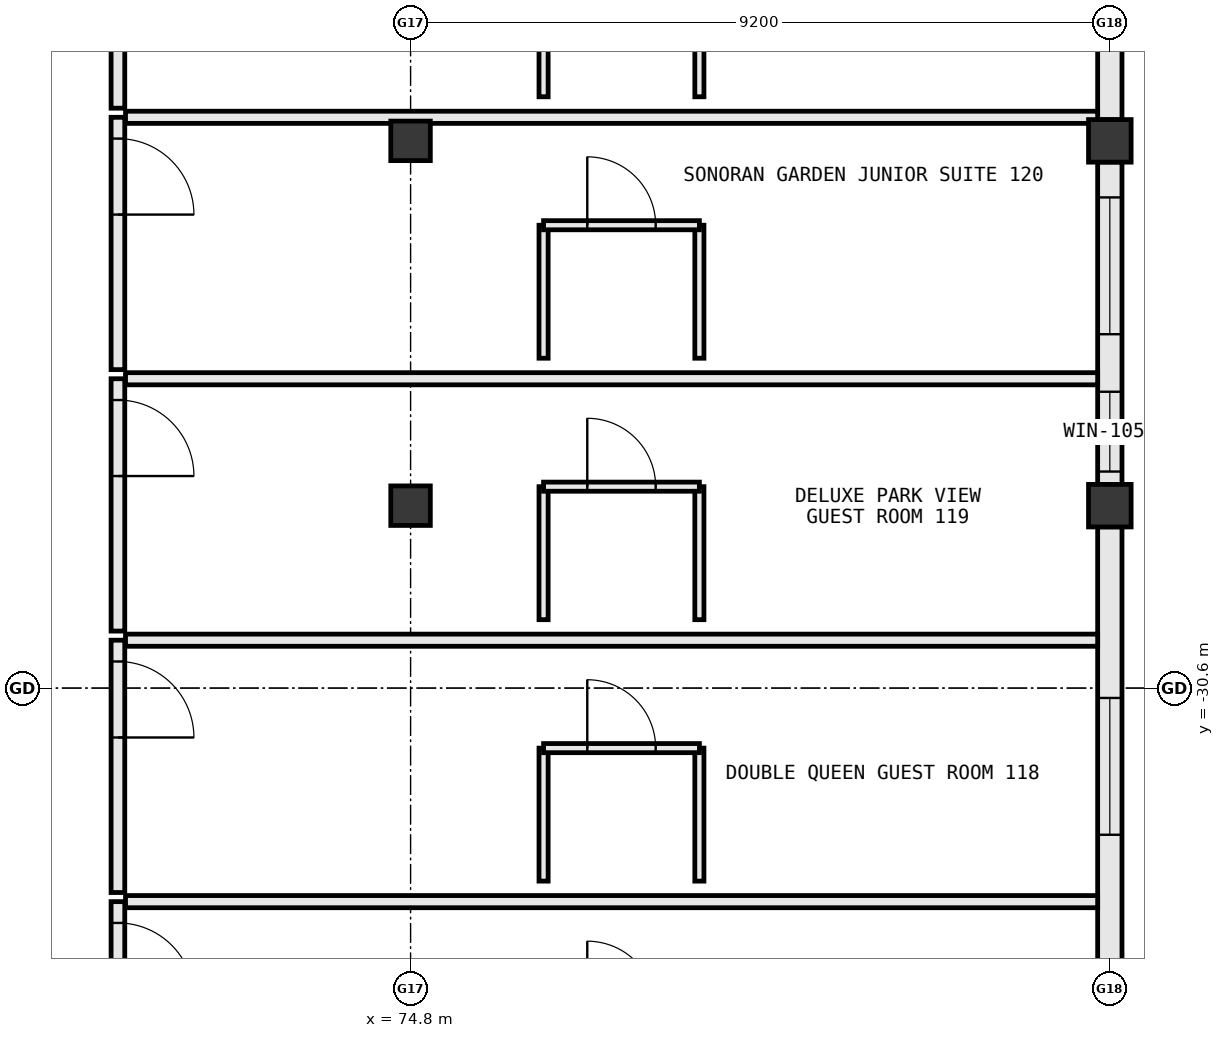
"""IFC4 building model, lengths in metres.
Left out: names, types, materials, properties, quantities, classifications, styles, units other than length and angle.
Written with IfcOpenShell. Run it as: python <this file> out.ifc"""

import sys

from ifc_helpers import new_model, si_unit, direction, frame, frame_2d, origin, origin_2d, place, context, subcontext, project, spatial, rectangle, extrude, element, fill, save


model = new_model("IFC4")
c1 = context("Model", 3, precision=1e-05, world=origin(), true_north=direction((0.0, 1.0)))
c2 = subcontext(c1, "Body", "Model", "MODEL_VIEW")
j1 = project(units=[si_unit("LENGTHUNIT", "METRE"), si_unit("PLANEANGLEUNIT", "RADIAN")], contexts=[c1])
p1 = place(None, origin())
s1 = spatial("IfcSite", under=j1, at=p1, CompositionType="ELEMENT")
p2 = place(p1, origin())
s2 = spatial("IfcBuilding", under=s1, at=p2, CompositionType="ELEMENT")
p3 = place(p2, frame((0.0, 0.0, 20.0)))
s3 = spatial("IfcBuildingStorey", under=s2, at=p3, CompositionType="ELEMENT", Elevation=20.0)
for number, where, z_axis, x_axis in (
    (1, (74.8, -28.2, 0.0), (0.0, 0.0, 1.0), (1.0, 0.0, 0.0)),
    (2, (74.8, -23.4, 0.0), (0.0, 0.0, 1.0), (1.0, 0.0, 0.0)),
):
    element("IfcColumn", number, at=place(p3, frame(where, z_axis=z_axis, x_axis=x_axis)), inside=s3, PredefinedType="COLUMN", context=c2, shape_type="SweptSolid", body=[
        extrude(rectangle(XDim=0.52, YDim=0.52, at=origin_2d()), origin(), (0.0, 0.0, 1.0), 3.8),
    ])
for number, where, z_axis, x_axis in (
    (3, (84.0, -28.2, 0.0), (0.0, 0.0, 1.0), (1.0, 0.0, 0.0)),
    (4, (84.0, -23.4, 0.0), (0.0, 0.0, 1.0), (1.0, 0.0, 0.0)),
):
    element("IfcColumn", number, at=place(p3, frame(where, z_axis=z_axis, x_axis=x_axis)), inside=s3, PredefinedType="COLUMN", context=c2, shape_type="SweptSolid", body=[
        extrude(rectangle(XDim=0.56, YDim=0.56, at=origin_2d()), origin(), (0.0, 0.0, 1.0), 3.8),
    ])
p4 = place(p3, frame((84.0, -37.522, 0.0), z_axis=(0.0, 0.0, 1.0), x_axis=(0.0, 1.0, 0.0)))
e5 = element("IfcWall", 5, at=p4, inside=s3, PredefinedType="STANDARD", context=c2, shape_type="SweptSolid", body=[
    extrude(rectangle(XDim=9.044, YDim=0.32, at=frame_2d((4.522, 0.0))), origin(), (0.0, 0.0, 1.0), 2.965),
])
p5 = place(p4, frame((1.552, 0.0, 0.85)))
e6 = element("IfcOpeningElement", 6, at=p5, cuts=e5, PredefinedType="OPENING", context=c2, shape_type="SweptSolid", body=[
    extrude(rectangle(XDim=1.8, YDim=1.85, at=frame_2d((0.9, 0.925))), frame((0.0, 0.172, 0.0), z_axis=(0.0, -1.0, 0.0), x_axis=(1.0, 0.0, 0.0)), (0.0, 0.0, 1.0), 0.344),
])
p6 = place(p4, frame((4.992, 0.0, 0.85)))
e7 = element("IfcOpeningElement", 7, at=p6, cuts=e5, PredefinedType="OPENING", context=c2, shape_type="SweptSolid", body=[
    extrude(rectangle(XDim=1.8, YDim=1.85, at=frame_2d((0.9, 0.925))), frame((0.0, 0.172, 0.0), z_axis=(0.0, -1.0, 0.0), x_axis=(1.0, 0.0, 0.0)), (0.0, 0.0, 1.0), 0.344),
])
p7 = place(p3, frame((84.0, -27.922, 0.0), z_axis=(0.0, 0.0, 1.0), x_axis=(0.0, 1.0, 0.0)))
e8 = element("IfcWall", 8, at=p7, inside=s3, PredefinedType="STANDARD", context=c2, shape_type="SweptSolid", body=[
    extrude(rectangle(XDim=4.244, YDim=0.32, at=frame_2d((2.122, 0.0))), origin(), (0.0, 0.0, 1.0), 2.965),
])
p8 = place(p7, frame((0.171, 0.0, 0.85)))
e9 = element("IfcOpeningElement", 9, at=p8, cuts=e8, PredefinedType="OPENING", context=c2, shape_type="SweptSolid", body=[
    extrude(rectangle(XDim=1.05, YDim=1.45, at=frame_2d((0.525, 0.725))), frame((0.0, 0.172, 0.0), z_axis=(0.0, -1.0, 0.0), x_axis=(1.0, 0.0, 0.0)), (0.0, 0.0, 1.0), 0.344),
])
p9 = place(p7, frame((1.978, 0.0, 0.85)))
e10 = element("IfcOpeningElement", 10, at=p9, cuts=e8, PredefinedType="OPENING", context=c2, shape_type="SweptSolid", body=[
    extrude(rectangle(XDim=1.8, YDim=1.85, at=frame_2d((0.9, 0.925))), frame((0.0, 0.172, 0.0), z_axis=(0.0, -1.0, 0.0), x_axis=(1.0, 0.0, 0.0)), (0.0, 0.0, 1.0), 0.344),
])
p10 = place(p3, frame((84.0, -23.122, 0.0), z_axis=(0.0, 0.0, 1.0), x_axis=(0.0, 1.0, 0.0)))
e11 = element("IfcWall", 11, at=p10, inside=s3, PredefinedType="STANDARD", context=c2, shape_type="SweptSolid", body=[
    extrude(rectangle(XDim=4.244, YDim=0.32, at=frame_2d((2.122, 0.0))), origin(), (0.0, 0.0, 1.0), 2.965),
])
p11 = place(p10, frame((0.912, 0.0, 0.85)))
e12 = element("IfcOpeningElement", 12, at=p11, cuts=e11, PredefinedType="OPENING", context=c2, shape_type="SweptSolid", body=[
    extrude(rectangle(XDim=1.8, YDim=1.85, at=frame_2d((0.9, 0.925))), frame((0.0, 0.172, 0.0), z_axis=(0.0, -1.0, 0.0), x_axis=(1.0, 0.0, 0.0)), (0.0, 0.0, 1.0), 0.344),
])
p12 = place(p3, frame((70.95, -33.41, 0.0), z_axis=(0.0, 0.0, 1.0), x_axis=(0.0, -1.0, 0.0)))
e13 = element("IfcWall", 13, at=p12, inside=s3, PredefinedType="PARTITIONING", context=c2, shape_type="SweptSolid", body=[
    extrude(rectangle(XDim=3.32, YDim=0.18, at=frame_2d((1.66, 0.0))), origin(), (0.0, 0.0, 1.0), 3.55),
])
p13 = place(p12, frame((0.28, 0.0, 0.0)))
e14 = element("IfcOpeningElement", 14, at=p13, cuts=e13, PredefinedType="OPENING", context=c2, shape_type="SweptSolid", body=[
    extrude(rectangle(XDim=1.0, YDim=2.2, at=frame_2d((0.5, 1.1))), frame((0.0, 0.102, 0.0), z_axis=(0.0, -1.0, 0.0), x_axis=(1.0, 0.0, 0.0)), (0.0, 0.0, 1.0), 0.204),
])
p14 = place(p3, frame((71.05, -33.41, 0.0), z_axis=(0.0, 0.0, 1.0), x_axis=(1.0, 0.0, 0.0)))
e15 = element("IfcWall", 15, at=p14, inside=s3, PredefinedType="PARTITIONING", context=c2, shape_type="SweptSolid", body=[
    extrude(rectangle(XDim=12.79, YDim=0.16, at=frame_2d((6.395, 0.0))), origin(), (0.0, 0.0, 1.0), 3.55),
])
p15 = place(p3, frame((70.95, -29.97, 0.0), z_axis=(0.0, 0.0, 1.0), x_axis=(0.0, -1.0, 0.0)))
e16 = element("IfcWall", 16, at=p15, inside=s3, PredefinedType="PARTITIONING", context=c2, shape_type="SweptSolid", body=[
    extrude(rectangle(XDim=3.32, YDim=0.18, at=frame_2d((1.66, 0.0))), origin(), (0.0, 0.0, 1.0), 3.55),
])
p16 = place(p15, frame((0.28, 0.0, 0.0)))
e17 = element("IfcOpeningElement", 17, at=p16, cuts=e16, PredefinedType="OPENING", context=c2, shape_type="SweptSolid", body=[
    extrude(rectangle(XDim=1.0, YDim=2.2, at=frame_2d((0.5, 1.1))), frame((0.0, 0.102, 0.0), z_axis=(0.0, -1.0, 0.0), x_axis=(1.0, 0.0, 0.0)), (0.0, 0.0, 1.0), 0.204),
])
p17 = place(p3, frame((71.05, -29.97, 0.0), z_axis=(0.0, 0.0, 1.0), x_axis=(1.0, 0.0, 0.0)))
e18 = element("IfcWall", 18, at=p17, inside=s3, PredefinedType="PARTITIONING", context=c2, shape_type="SweptSolid", body=[
    extrude(rectangle(XDim=12.79, YDim=0.16, at=frame_2d((6.395, 0.0))), origin(), (0.0, 0.0, 1.0), 3.55),
])
for number, where, z_axis, x_axis in (
    (19, (76.55, -33.14, 0.0), (0.0, 0.0, 1.0), (0.0, 1.0, 0.0)),
    (20, (78.6, -33.14, 0.0), (0.0, 0.0, 1.0), (0.0, 1.0, 0.0)),
):
    element("IfcWall", number, at=place(p3, frame(where, z_axis=z_axis, x_axis=x_axis)), inside=s3, PredefinedType="PARTITIONING", context=c2, shape_type="SweptSolid", body=[
        extrude(rectangle(XDim=1.75, YDim=0.12, at=frame_2d((0.875, 0.0))), origin(), (0.0, 0.0, 1.0), 3.55),
    ])
p18 = place(p3, frame((76.55, -31.39, 0.0), z_axis=(0.0, 0.0, 1.0), x_axis=(1.0, 0.0, 0.0)))
e21 = element("IfcWall", 21, at=p18, inside=s3, PredefinedType="PARTITIONING", context=c2, shape_type="SweptSolid", body=[
    extrude(rectangle(XDim=2.05, YDim=0.12, at=frame_2d((1.025, 0.0))), origin(), (0.0, 0.0, 1.0), 3.55),
])
p19 = place(p18, frame((0.575, 0.0, 0.0)))
e22 = element("IfcOpeningElement", 22, at=p19, cuts=e21, PredefinedType="OPENING", context=c2, shape_type="SweptSolid", body=[
    extrude(rectangle(XDim=0.9, YDim=2.15, at=frame_2d((0.45, 1.075))), frame((0.0, 0.072, 0.0), z_axis=(0.0, -1.0, 0.0), x_axis=(1.0, 0.0, 0.0)), (0.0, 0.0, 1.0), 0.144),
])
p20 = place(p3, frame((70.95, -26.53, 0.0), z_axis=(0.0, 0.0, 1.0), x_axis=(0.0, -1.0, 0.0)))
e23 = element("IfcWall", 23, at=p20, inside=s3, PredefinedType="PARTITIONING", context=c2, shape_type="SweptSolid", body=[
    extrude(rectangle(XDim=3.32, YDim=0.18, at=frame_2d((1.66, 0.0))), origin(), (0.0, 0.0, 1.0), 3.55),
])
p21 = place(p20, frame((0.28, 0.0, 0.0)))
e24 = element("IfcOpeningElement", 24, at=p21, cuts=e23, PredefinedType="OPENING", context=c2, shape_type="SweptSolid", body=[
    extrude(rectangle(XDim=1.0, YDim=2.2, at=frame_2d((0.5, 1.1))), frame((0.0, 0.102, 0.0), z_axis=(0.0, -1.0, 0.0), x_axis=(1.0, 0.0, 0.0)), (0.0, 0.0, 1.0), 0.204),
])
p22 = place(p3, frame((71.05, -26.53, 0.0), z_axis=(0.0, 0.0, 1.0), x_axis=(1.0, 0.0, 0.0)))
e25 = element("IfcWall", 25, at=p22, inside=s3, PredefinedType="PARTITIONING", context=c2, shape_type="SweptSolid", body=[
    extrude(rectangle(XDim=12.79, YDim=0.16, at=frame_2d((6.395, 0.0))), origin(), (0.0, 0.0, 1.0), 3.55),
])
for number, where, z_axis, x_axis in (
    (26, (76.55, -29.7, 0.0), (0.0, 0.0, 1.0), (0.0, 1.0, 0.0)),
    (27, (78.6, -29.7, 0.0), (0.0, 0.0, 1.0), (0.0, 1.0, 0.0)),
):
    element("IfcWall", number, at=place(p3, frame(where, z_axis=z_axis, x_axis=x_axis)), inside=s3, PredefinedType="PARTITIONING", context=c2, shape_type="SweptSolid", body=[
        extrude(rectangle(XDim=1.75, YDim=0.12, at=frame_2d((0.875, 0.0))), origin(), (0.0, 0.0, 1.0), 3.55),
    ])
p23 = place(p3, frame((76.55, -27.95, 0.0), z_axis=(0.0, 0.0, 1.0), x_axis=(1.0, 0.0, 0.0)))
e28 = element("IfcWall", 28, at=p23, inside=s3, PredefinedType="PARTITIONING", context=c2, shape_type="SweptSolid", body=[
    extrude(rectangle(XDim=2.05, YDim=0.12, at=frame_2d((1.025, 0.0))), origin(), (0.0, 0.0, 1.0), 2.905),
])
p24 = place(p23, frame((0.575, 0.0, 0.0)))
e29 = element("IfcOpeningElement", 29, at=p24, cuts=e28, PredefinedType="OPENING", context=c2, shape_type="SweptSolid", body=[
    extrude(rectangle(XDim=0.9, YDim=2.15, at=frame_2d((0.45, 1.075))), frame((0.0, 0.072, 0.0), z_axis=(0.0, -1.0, 0.0), x_axis=(1.0, 0.0, 0.0)), (0.0, 0.0, 1.0), 0.144),
])
p25 = place(p3, frame((70.95, -23.09, 0.0), z_axis=(0.0, 0.0, 1.0), x_axis=(0.0, -1.0, 0.0)))
e30 = element("IfcWall", 30, at=p25, inside=s3, PredefinedType="PARTITIONING", context=c2, shape_type="SweptSolid", body=[
    extrude(rectangle(XDim=3.32, YDim=0.18, at=frame_2d((1.66, 0.0))), origin(), (0.0, 0.0, 1.0), 3.55),
])
p26 = place(p25, frame((0.28, 0.0, 0.0)))
e31 = element("IfcOpeningElement", 31, at=p26, cuts=e30, PredefinedType="OPENING", context=c2, shape_type="SweptSolid", body=[
    extrude(rectangle(XDim=1.0, YDim=2.2, at=frame_2d((0.5, 1.1))), frame((0.0, 0.102, 0.0), z_axis=(0.0, -1.0, 0.0), x_axis=(1.0, 0.0, 0.0)), (0.0, 0.0, 1.0), 0.204),
])
p27 = place(p3, frame((71.05, -23.09, 0.0), z_axis=(0.0, 0.0, 1.0), x_axis=(1.0, 0.0, 0.0)))
e32 = element("IfcWall", 32, at=p27, inside=s3, PredefinedType="PARTITIONING", context=c2, shape_type="SweptSolid", body=[
    extrude(rectangle(XDim=12.79, YDim=0.16, at=frame_2d((6.395, 0.0))), origin(), (0.0, 0.0, 1.0), 2.685),
])
for number, where, z_axis, x_axis in (
    (33, (76.55, -26.26, 0.0), (0.0, 0.0, 1.0), (0.0, 1.0, 0.0)),
    (34, (78.6, -26.26, 0.0), (0.0, 0.0, 1.0), (0.0, 1.0, 0.0)),
):
    element("IfcWall", number, at=place(p3, frame(where, z_axis=z_axis, x_axis=x_axis)), inside=s3, PredefinedType="PARTITIONING", context=c2, shape_type="SweptSolid", body=[
        extrude(rectangle(XDim=1.75, YDim=0.12, at=frame_2d((0.875, 0.0))), origin(), (0.0, 0.0, 1.0), 3.55),
    ])
p28 = place(p3, frame((76.55, -24.51, 0.0), z_axis=(0.0, 0.0, 1.0), x_axis=(1.0, 0.0, 0.0)))
e35 = element("IfcWall", 35, at=p28, inside=s3, PredefinedType="PARTITIONING", context=c2, shape_type="SweptSolid", body=[
    extrude(rectangle(XDim=2.05, YDim=0.12, at=frame_2d((1.025, 0.0))), origin(), (0.0, 0.0, 1.0), 3.55),
])
p29 = place(p28, frame((0.575, 0.0, 0.0)))
e36 = element("IfcOpeningElement", 36, at=p29, cuts=e35, PredefinedType="OPENING", context=c2, shape_type="SweptSolid", body=[
    extrude(rectangle(XDim=0.9, YDim=2.15, at=frame_2d((0.45, 1.075))), frame((0.0, 0.072, 0.0), z_axis=(0.0, -1.0, 0.0), x_axis=(1.0, 0.0, 0.0)), (0.0, 0.0, 1.0), 0.144),
])
p30 = place(p3, frame((70.95, -19.65, 0.0), z_axis=(0.0, 0.0, 1.0), x_axis=(0.0, -1.0, 0.0)))
e37 = element("IfcWall", 37, at=p30, inside=s3, PredefinedType="PARTITIONING", context=c2, shape_type="SweptSolid", body=[
    extrude(rectangle(XDim=3.32, YDim=0.18, at=frame_2d((1.66, 0.0))), origin(), (0.0, 0.0, 1.0), 3.55),
])
p31 = place(p30, frame((0.28, 0.0, 0.0)))
e38 = element("IfcOpeningElement", 38, at=p31, cuts=e37, PredefinedType="OPENING", context=c2, shape_type="SweptSolid", body=[
    extrude(rectangle(XDim=1.0, YDim=2.2, at=frame_2d((0.5, 1.1))), frame((0.0, 0.102, 0.0), z_axis=(0.0, -1.0, 0.0), x_axis=(1.0, 0.0, 0.0)), (0.0, 0.0, 1.0), 0.204),
])
for number, where, z_axis, x_axis in (
    (39, (76.55, -22.82, 0.0), (0.0, 0.0, 1.0), (0.0, 1.0, 0.0)),
    (40, (78.6, -22.82, 0.0), (0.0, 0.0, 1.0), (0.0, 1.0, 0.0)),
):
    element("IfcWall", number, at=place(p3, frame(where, z_axis=z_axis, x_axis=x_axis)), inside=s3, PredefinedType="PARTITIONING", context=c2, shape_type="SweptSolid", body=[
        extrude(rectangle(XDim=1.75, YDim=0.12, at=frame_2d((0.875, 0.0))), origin(), (0.0, 0.0, 1.0), 3.55),
    ])
p32 = place(p6, origin())
e41 = element("IfcWindow", 41, at=p32, inside=s3, PartitioningType="SINGLE_PANEL", PredefinedType="WINDOW", context=c2, shape_type="SweptSolid", body=[
    extrude(rectangle(XDim=1.8, YDim=1.85, at=frame_2d((0.9, 0.925))), frame((0.0, 0.03, 0.0), z_axis=(0.0, -1.0, 0.0), x_axis=(1.0, 0.0, 0.0)), (0.0, 0.0, 1.0), 0.06),
])
fill(e7, e41)
p33 = place(p8, origin())
e42 = element("IfcWindow", 42, at=p33, inside=s3, PartitioningType="SINGLE_PANEL", PredefinedType="WINDOW", context=c2, shape_type="SweptSolid", body=[
    extrude(rectangle(XDim=1.05, YDim=1.45, at=frame_2d((0.525, 0.725))), frame((0.0, 0.03, 0.0), z_axis=(0.0, -1.0, 0.0), x_axis=(1.0, 0.0, 0.0)), (0.0, 0.0, 1.0), 0.06),
])
fill(e9, e42)
p34 = place(p9, origin())
e43 = element("IfcWindow", 43, at=p34, inside=s3, PartitioningType="SINGLE_PANEL", PredefinedType="WINDOW", context=c2, shape_type="SweptSolid", body=[
    extrude(rectangle(XDim=1.8, YDim=1.85, at=frame_2d((0.9, 0.925))), frame((0.0, 0.03, 0.0), z_axis=(0.0, -1.0, 0.0), x_axis=(1.0, 0.0, 0.0)), (0.0, 0.0, 1.0), 0.06),
])
fill(e10, e43)
p35 = place(p13, origin())
e44 = element("IfcDoor", 44, at=p35, inside=s3, OperationType="SINGLE_SWING_RIGHT", PredefinedType="DOOR", context=c2, shape_type="SweptSolid", body=[
    extrude(rectangle(XDim=1.0, YDim=2.2, at=frame_2d((0.5, 1.1))), frame((0.0, 0.025, 0.0), z_axis=(0.0, -1.0, 0.0), x_axis=(1.0, 0.0, 0.0)), (0.0, 0.0, 1.0), 0.05),
])
fill(e14, e44)
p36 = place(p16, origin())
e45 = element("IfcDoor", 45, at=p36, inside=s3, OperationType="SINGLE_SWING_RIGHT", PredefinedType="DOOR", context=c2, shape_type="SweptSolid", body=[
    extrude(rectangle(XDim=1.0, YDim=2.2, at=frame_2d((0.5, 1.1))), frame((0.0, 0.025, 0.0), z_axis=(0.0, -1.0, 0.0), x_axis=(1.0, 0.0, 0.0)), (0.0, 0.0, 1.0), 0.05),
])
fill(e17, e45)
p37 = place(p19, origin())
e46 = element("IfcDoor", 46, at=p37, inside=s3, OperationType="SINGLE_SWING_LEFT", PredefinedType="DOOR", context=c2, shape_type="SweptSolid", body=[
    extrude(rectangle(XDim=0.9, YDim=2.15, at=frame_2d((0.45, 1.075))), frame((0.0, 0.025, 0.0), z_axis=(0.0, -1.0, 0.0), x_axis=(1.0, 0.0, 0.0)), (0.0, 0.0, 1.0), 0.05),
])
fill(e22, e46)
p38 = place(p21, origin())
e47 = element("IfcDoor", 47, at=p38, inside=s3, OperationType="SINGLE_SWING_RIGHT", PredefinedType="DOOR", context=c2, shape_type="SweptSolid", body=[
    extrude(rectangle(XDim=1.0, YDim=2.2, at=frame_2d((0.5, 1.1))), frame((0.0, 0.025, 0.0), z_axis=(0.0, -1.0, 0.0), x_axis=(1.0, 0.0, 0.0)), (0.0, 0.0, 1.0), 0.05),
])
fill(e24, e47)
p39 = place(p24, origin())
e48 = element("IfcDoor", 48, at=p39, inside=s3, OperationType="SINGLE_SWING_LEFT", PredefinedType="DOOR", context=c2, shape_type="SweptSolid", body=[
    extrude(rectangle(XDim=0.9, YDim=2.15, at=frame_2d((0.45, 1.075))), frame((0.0, 0.025, 0.0), z_axis=(0.0, -1.0, 0.0), x_axis=(1.0, 0.0, 0.0)), (0.0, 0.0, 1.0), 0.05),
])
fill(e29, e48)
p40 = place(p26, origin())
e49 = element("IfcDoor", 49, at=p40, inside=s3, OperationType="SINGLE_SWING_RIGHT", PredefinedType="DOOR", context=c2, shape_type="SweptSolid", body=[
    extrude(rectangle(XDim=1.0, YDim=2.2, at=frame_2d((0.5, 1.1))), frame((0.0, 0.025, 0.0), z_axis=(0.0, -1.0, 0.0), x_axis=(1.0, 0.0, 0.0)), (0.0, 0.0, 1.0), 0.05),
])
fill(e31, e49)
p41 = place(p29, origin())
e50 = element("IfcDoor", 50, at=p41, inside=s3, OperationType="SINGLE_SWING_LEFT", PredefinedType="DOOR", context=c2, shape_type="SweptSolid", body=[
    extrude(rectangle(XDim=0.9, YDim=2.15, at=frame_2d((0.45, 1.075))), frame((0.0, 0.025, 0.0), z_axis=(0.0, -1.0, 0.0), x_axis=(1.0, 0.0, 0.0)), (0.0, 0.0, 1.0), 0.05),
])
fill(e36, e50)
save(model, sys.argv[1])
